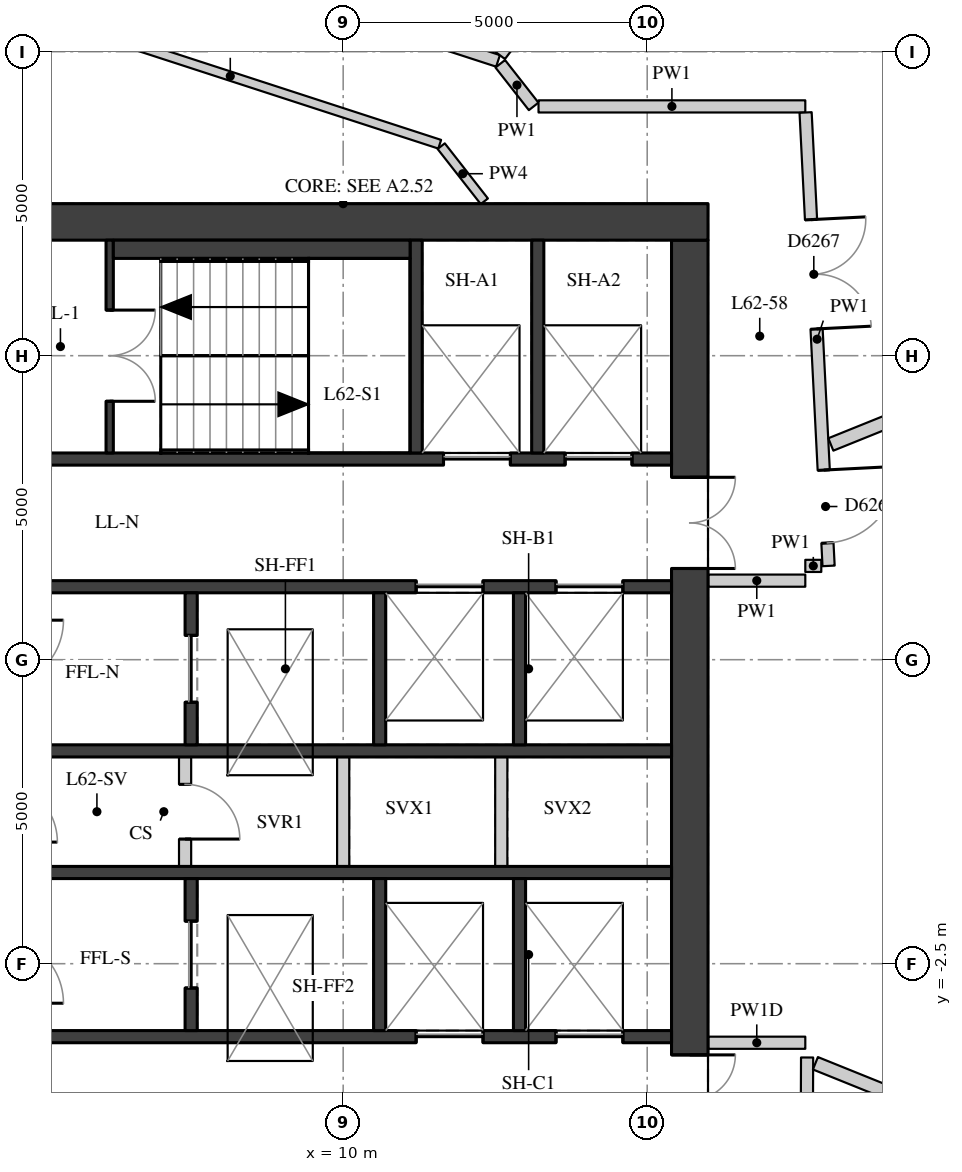
"""IFC4 building model, lengths in metres.
Left out: names, types, materials, properties, quantities, classifications, styles, units other than length and angle.
Written with IfcOpenShell. Run it as: python <this file> out.ifc"""

import sys

from ifc_helpers import new_model, si_unit, direction, frame, frame_2d, origin, place, context, subcontext, project, spatial, rectangle, extrude, element, fill, save


model = new_model("IFC4")
c1 = context("Model", 3, precision=1e-05, world=origin(), true_north=direction((0.0, 1.0)))
c2 = subcontext(c1, "Body", "Model", "MODEL_VIEW")
j1 = project(units=[si_unit("LENGTHUNIT", "METRE"), si_unit("PLANEANGLEUNIT", "RADIAN")], contexts=[c1])
p1 = place(None, origin())
s1 = spatial("IfcSite", under=j1, at=p1, CompositionType="ELEMENT")
p2 = place(p1, origin())
s2 = spatial("IfcBuilding", under=s1, at=p2, CompositionType="ELEMENT")
p3 = place(p2, frame((0.0, 0.0, 218.9)))
s3 = spatial("IfcBuildingStorey", under=s2, at=p3, CompositionType="ELEMENT", Elevation=218.9)
p4 = place(p3, frame((15.7, -9.4, 0.0), z_axis=(0.0, 0.0, 1.0), x_axis=(0.0, 1.0, 0.0)))
e1 = element("IfcWall", 1, at=p4, inside=s3, PredefinedType="SHEAR", context=c2, shape_type="SweptSolid", body=[
    extrude(rectangle(XDim=18.8, YDim=0.6, at=frame_2d((9.4, 0.0))), origin(), (0.0, 0.0, 1.0), 3.02),
])
p5 = place(p4, frame((13.4, 0.0, 0.0)))
e2 = element("IfcOpeningElement", 2, at=p5, cuts=e1, PredefinedType="OPENING", context=c2, shape_type="SweptSolid", body=[
    extrude(rectangle(XDim=1.5, YDim=2.1, at=frame_2d((0.75, 1.05))), frame((0.0, 0.31, 0.0), z_axis=(0.0, -1.0, 0.0), x_axis=(1.0, 0.0, 0.0)), (0.0, 0.0, 1.0), 0.62),
])
p6 = place(p4, frame((3.9, 0.0, 0.0)))
e3 = element("IfcOpeningElement", 3, at=p6, cuts=e1, PredefinedType="OPENING", context=c2, shape_type="SweptSolid", body=[
    extrude(rectangle(XDim=1.5, YDim=2.1, at=frame_2d((0.75, 1.05))), frame((0.0, 0.31, 0.0), z_axis=(0.0, -1.0, 0.0), x_axis=(1.0, 0.0, 0.0)), (0.0, 0.0, 1.0), 0.62),
])
p7 = place(p3, frame((4.0, 9.7, 0.0), z_axis=(0.0, 0.0, 1.0), x_axis=(1.0, 0.0, 0.0)))
e4 = element("IfcWall", 4, at=p7, inside=s3, PredefinedType="SHEAR", context=c2, shape_type="SweptSolid", body=[
    extrude(rectangle(XDim=12.0, YDim=0.6, at=frame_2d((6.0, 0.0))), origin(), (0.0, 0.0, 1.0), 3.02),
])
p8 = place(p3, frame((4.6, 5.8, 0.0), z_axis=(0.0, 0.0, 1.0), x_axis=(1.0, 0.0, 0.0)))
e5 = element("IfcWall", 5, at=p8, inside=s3, PredefinedType="SHEAR", context=c2, shape_type="SweptSolid", body=[
    extrude(rectangle(XDim=10.8, YDim=0.2, at=frame_2d((5.4, 0.0))), origin(), (0.0, 0.0, 1.0), 3.02),
])
p9 = place(p8, frame((7.05, 0.0, 0.0)))
e6 = element("IfcOpeningElement", 6, at=p9, cuts=e5, PredefinedType="OPENING", context=c2, shape_type="SweptSolid", body=[
    extrude(rectangle(XDim=1.1, YDim=2.1, at=frame_2d((0.55, 1.05))), frame((0.0, 0.11, 0.0), z_axis=(0.0, -1.0, 0.0), x_axis=(1.0, 0.0, 0.0)), (0.0, 0.0, 1.0), 0.22),
])
p10 = place(p8, frame((9.05, 0.0, 0.0)))
e7 = element("IfcOpeningElement", 7, at=p10, cuts=e5, PredefinedType="OPENING", context=c2, shape_type="SweptSolid", body=[
    extrude(rectangle(XDim=1.1, YDim=2.1, at=frame_2d((0.55, 1.05))), frame((0.0, 0.11, 0.0), z_axis=(0.0, -1.0, 0.0), x_axis=(1.0, 0.0, 0.0)), (0.0, 0.0, 1.0), 0.22),
])
p11 = place(p3, frame((4.6, 3.7, 0.0), z_axis=(0.0, 0.0, 1.0), x_axis=(1.0, 0.0, 0.0)))
e8 = element("IfcWall", 8, at=p11, inside=s3, PredefinedType="SHEAR", context=c2, shape_type="SweptSolid", body=[
    extrude(rectangle(XDim=10.8, YDim=0.2, at=frame_2d((5.4, 0.0))), origin(), (0.0, 0.0, 1.0), 3.02),
])
p12 = place(p11, frame((6.6, 0.0, 0.0)))
e9 = element("IfcOpeningElement", 9, at=p12, cuts=e8, PredefinedType="OPENING", context=c2, shape_type="SweptSolid", body=[
    extrude(rectangle(XDim=1.1, YDim=2.1, at=frame_2d((0.55, 1.05))), frame((0.0, 0.11, 0.0), z_axis=(0.0, -1.0, 0.0), x_axis=(1.0, 0.0, 0.0)), (0.0, 0.0, 1.0), 0.22),
])
p13 = place(p11, frame((8.9, 0.0, 0.0)))
e10 = element("IfcOpeningElement", 10, at=p13, cuts=e8, PredefinedType="OPENING", context=c2, shape_type="SweptSolid", body=[
    extrude(rectangle(XDim=1.1, YDim=2.1, at=frame_2d((0.55, 1.05))), frame((0.0, 0.11, 0.0), z_axis=(0.0, -1.0, 0.0), x_axis=(1.0, 0.0, 0.0)), (0.0, 0.0, 1.0), 0.22),
])
for number, where, z_axis, x_axis in (
    (11, (4.6, 1.0, 0.0), (0.0, 0.0, 1.0), (1.0, 0.0, 0.0)),
    (12, (4.6, -1.0, 0.0), (0.0, 0.0, 1.0), (1.0, 0.0, 0.0)),
):
    element("IfcWall", number, at=place(p3, frame(where, z_axis=z_axis, x_axis=x_axis)), inside=s3, PredefinedType="SHEAR", context=c2, shape_type="SweptSolid", body=[
        extrude(rectangle(XDim=10.8, YDim=0.2, at=frame_2d((5.4, 0.0))), origin(), (0.0, 0.0, 1.0), 3.02),
    ])
p14 = place(p3, frame((4.6, -3.7, 0.0), z_axis=(0.0, 0.0, 1.0), x_axis=(1.0, 0.0, 0.0)))
e13 = element("IfcWall", 13, at=p14, inside=s3, PredefinedType="SHEAR", context=c2, shape_type="SweptSolid", body=[
    extrude(rectangle(XDim=10.8, YDim=0.2, at=frame_2d((5.4, 0.0))), origin(), (0.0, 0.0, 1.0), 3.02),
])
p15 = place(p14, frame((6.6, 0.0, 0.0)))
e14 = element("IfcOpeningElement", 14, at=p15, cuts=e13, PredefinedType="OPENING", context=c2, shape_type="SweptSolid", body=[
    extrude(rectangle(XDim=1.1, YDim=2.1, at=frame_2d((0.55, 1.05))), frame((0.0, 0.11, 0.0), z_axis=(0.0, -1.0, 0.0), x_axis=(1.0, 0.0, 0.0)), (0.0, 0.0, 1.0), 0.22),
])
p16 = place(p14, frame((8.9, 0.0, 0.0)))
e15 = element("IfcOpeningElement", 15, at=p16, cuts=e13, PredefinedType="OPENING", context=c2, shape_type="SweptSolid", body=[
    extrude(rectangle(XDim=1.1, YDim=2.1, at=frame_2d((0.55, 1.05))), frame((0.0, 0.11, 0.0), z_axis=(0.0, -1.0, 0.0), x_axis=(1.0, 0.0, 0.0)), (0.0, 0.0, 1.0), 0.22),
])
for number, where, z_axis, x_axis in (
    (16, (11.2, 5.9, 0.0), (0.0, 0.0, 1.0), (0.0, 1.0, 0.0)),
    (17, (13.2, 5.9, 0.0), (0.0, 0.0, 1.0), (0.0, 1.0, 0.0)),
):
    element("IfcWall", number, at=place(p3, frame(where, z_axis=z_axis, x_axis=x_axis)), inside=s3, PredefinedType="SHEAR", context=c2, shape_type="SweptSolid", body=[
        extrude(rectangle(XDim=3.5, YDim=0.2, at=frame_2d((1.75, 0.0))), origin(), (0.0, 0.0, 1.0), 3.02),
    ])
p17 = place(p3, frame((7.5, 1.1, 0.0), z_axis=(0.0, 0.0, 1.0), x_axis=(0.0, 1.0, 0.0)))
e18 = element("IfcWall", 18, at=p17, inside=s3, PredefinedType="SHEAR", context=c2, shape_type="SweptSolid", body=[
    extrude(rectangle(XDim=2.5, YDim=0.2, at=frame_2d((1.25, 0.0))), origin(), (0.0, 0.0, 1.0), 3.02),
])
p18 = place(p17, frame((0.7, 0.0, 0.0)))
e19 = element("IfcOpeningElement", 19, at=p18, cuts=e18, PredefinedType="OPENING", context=c2, shape_type="SweptSolid", body=[
    extrude(rectangle(XDim=1.1, YDim=2.1, at=frame_2d((0.55, 1.05))), frame((0.0, 0.11, 0.0), z_axis=(0.0, -1.0, 0.0), x_axis=(1.0, 0.0, 0.0)), (0.0, 0.0, 1.0), 0.22),
])
p19 = place(p3, frame((7.5, -3.6, 0.0), z_axis=(0.0, 0.0, 1.0), x_axis=(0.0, 1.0, 0.0)))
e20 = element("IfcWall", 20, at=p19, inside=s3, PredefinedType="SHEAR", context=c2, shape_type="SweptSolid", body=[
    extrude(rectangle(XDim=2.5, YDim=0.2, at=frame_2d((1.25, 0.0))), origin(), (0.0, 0.0, 1.0), 3.02),
])
p20 = place(p19, frame((0.7, 0.0, 0.0)))
e21 = element("IfcOpeningElement", 21, at=p20, cuts=e20, PredefinedType="OPENING", context=c2, shape_type="SweptSolid", body=[
    extrude(rectangle(XDim=1.1, YDim=2.1, at=frame_2d((0.55, 1.05))), frame((0.0, 0.11, 0.0), z_axis=(0.0, -1.0, 0.0), x_axis=(1.0, 0.0, 0.0)), (0.0, 0.0, 1.0), 0.22),
])
for number, where, z_axis, x_axis in (
    (22, (10.6, 1.1, 0.0), (0.0, 0.0, 1.0), (0.0, 1.0, 0.0)),
    (23, (10.6, -3.6, 0.0), (0.0, 0.0, 1.0), (0.0, 1.0, 0.0)),
    (24, (12.9, 1.1, 0.0), (0.0, 0.0, 1.0), (0.0, 1.0, 0.0)),
    (25, (12.9, -3.6, 0.0), (0.0, 0.0, 1.0), (0.0, 1.0, 0.0)),
):
    element("IfcWall", number, at=place(p3, frame(where, z_axis=z_axis, x_axis=x_axis)), inside=s3, PredefinedType="SHEAR", context=c2, shape_type="SweptSolid", body=[
        extrude(rectangle(XDim=2.5, YDim=0.2, at=frame_2d((1.25, 0.0))), origin(), (0.0, 0.0, 1.0), 3.02),
    ])
p21 = place(p3, frame((6.16, 5.9, 0.0), z_axis=(0.0, 0.0, 1.0), x_axis=(0.0, 1.0, 0.0)))
e26 = element("IfcWall", 26, at=p21, inside=s3, PredefinedType="SHEAR", context=c2, shape_type="SweptSolid", body=[
    extrude(rectangle(XDim=3.5, YDim=0.12, at=frame_2d((1.75, 0.0))), origin(), (0.0, 0.0, 1.0), 3.02),
])
p22 = place(p21, frame((0.85, 0.0, 0.0)))
e27 = element("IfcOpeningElement", 27, at=p22, cuts=e26, PredefinedType="OPENING", context=c2, shape_type="SweptSolid", body=[
    extrude(rectangle(XDim=1.5, YDim=2.1, at=frame_2d((0.75, 1.05))), frame((0.0, 0.07, 0.0), z_axis=(0.0, -1.0, 0.0), x_axis=(1.0, 0.0, 0.0)), (0.0, 0.0, 1.0), 0.14),
])
p23 = place(p3, frame((7.4, -0.9, 0.0), z_axis=(0.0, 0.0, 1.0), x_axis=(0.0, 1.0, 0.0)))
e28 = element("IfcWall", 28, at=p23, inside=s3, PredefinedType="PARTITIONING", context=c2, shape_type="SweptSolid", body=[
    extrude(rectangle(XDim=1.8, YDim=0.2, at=frame_2d((0.9, 0.0))), origin(), (0.0, 0.0, 1.0), 3.02),
])
p24 = place(p23, frame((0.45, 0.0, 0.0)))
e29 = element("IfcOpeningElement", 29, at=p24, cuts=e28, PredefinedType="OPENING", context=c2, shape_type="SweptSolid", body=[
    extrude(rectangle(XDim=0.9, YDim=2.1, at=frame_2d((0.45, 1.05))), frame((0.0, 0.11, 0.0), z_axis=(0.0, -1.0, 0.0), x_axis=(1.0, 0.0, 0.0)), (0.0, 0.0, 1.0), 0.22),
])
for number, where, z_axis, x_axis in (
    (30, (10.0, -0.9, 0.0), (0.0, 0.0, 1.0), (0.0, 1.0, 0.0)),
    (31, (12.6, -0.9, 0.0), (0.0, 0.0, 1.0), (0.0, 1.0, 0.0)),
):
    element("IfcWall", number, at=place(p3, frame(where, z_axis=z_axis, x_axis=x_axis)), inside=s3, PredefinedType="PARTITIONING", context=c2, shape_type="SweptSolid", body=[
        extrude(rectangle(XDim=1.8, YDim=0.2, at=frame_2d((0.9, 0.0))), origin(), (0.0, 0.0, 1.0), 3.02),
    ])
p25 = place(p3, frame((6.22, 9.25, 0.0), z_axis=(0.0, 0.0, 1.0), x_axis=(1.0, 0.0, 0.0)))
e32 = element("IfcWall", 32, at=p25, inside=s3, PredefinedType="PARTITIONING", context=c2, shape_type="SweptSolid", body=[
    extrude(rectangle(XDim=4.88, YDim=0.3, at=frame_2d((2.44, 0.0))), origin(), (0.0, 0.0, 1.0), 3.02),
])
p26 = place(p3, frame((17.63, -4.043, 0.0), z_axis=(0.0, 0.0, 1.0), x_axis=(-0.003908870153, -0.999992360338, 0.0)))
e33 = element("IfcWall", 33, at=p26, inside=s3, PredefinedType="PARTITIONING", context=c2, shape_type="SweptSolid", body=[
    extrude(rectangle(XDim=7.557, YDim=0.2, at=frame_2d((3.779, 0.0))), origin(), (0.0, 0.0, 1.0), 3.02),
])
p27 = place(p3, frame((0.795, 16.169, 0.0), z_axis=(0.0, 0.0, 1.0), x_axis=(0.950998491074, -0.309195520626, 0.0)))
e34 = element("IfcWall", 34, at=p27, inside=s3, PredefinedType="PARTITIONING", context=c2, shape_type="SweptSolid", body=[
    extrude(rectangle(XDim=12.357, YDim=0.2, at=frame_2d((6.179, 0.0))), origin(), (0.0, 0.0, 1.0), 3.02),
])
p28 = place(p27, frame((8.496, 0.0, 0.0)))
e35 = element("IfcOpeningElement", 35, at=p28, cuts=e34, PredefinedType="OPENING", context=c2, shape_type="SweptSolid", body=[
    extrude(rectangle(XDim=1.1, YDim=2.1, at=frame_2d((0.55, 1.05))), frame((0.0, 0.11, 0.0), z_axis=(0.0, -1.0, 0.0), x_axis=(1.0, 0.0, 0.0)), (0.0, 0.0, 1.0), 0.22),
])
p29 = place(p27, frame((4.169, 0.0, 0.0)))
e36 = element("IfcOpeningElement", 36, at=p29, cuts=e34, PredefinedType="OPENING", context=c2, shape_type="SweptSolid", body=[
    extrude(rectangle(XDim=0.9, YDim=2.1, at=frame_2d((0.45, 1.05))), frame((0.0, 0.11, 0.0), z_axis=(0.0, -1.0, 0.0), x_axis=(1.0, 0.0, 0.0)), (0.0, 0.0, 1.0), 0.22),
])
p30 = place(p27, frame((0.747, 0.0, 0.0)))
e37 = element("IfcOpeningElement", 37, at=p30, cuts=e34, PredefinedType="OPENING", context=c2, shape_type="SweptSolid", body=[
    extrude(rectangle(XDim=0.9, YDim=2.1, at=frame_2d((0.45, 1.05))), frame((0.0, 0.11, 0.0), z_axis=(0.0, -1.0, 0.0), x_axis=(1.0, 0.0, 0.0)), (0.0, 0.0, 1.0), 0.22),
])
p31 = place(p3, frame((12.583, 12.301, 0.0), z_axis=(0.0, 0.0, 1.0), x_axis=(0.616670471626, -0.787221397972, 0.0)))
e38 = element("IfcWall", 38, at=p31, inside=s3, PredefinedType="PARTITIONING", context=c2, shape_type="SweptSolid", body=[
    extrude(rectangle(XDim=0.89, YDim=0.2, at=frame_2d((0.445, 0.0))), origin(), (0.0, 0.0, 1.0), 3.02),
])
p32 = place(p3, frame((13.213, 11.6, 0.0), z_axis=(0.0, 0.0, 1.0), x_axis=(1.0, 0.0, 0.0)))
e39 = element("IfcWall", 39, at=p32, inside=s3, PredefinedType="PARTITIONING", context=c2, shape_type="SweptSolid", body=[
    extrude(rectangle(XDim=4.387, YDim=0.2, at=frame_2d((2.194, 0.0))), origin(), (0.0, 0.0, 1.0), 3.02),
])
p33 = place(p3, frame((17.605, 11.5, 0.0), z_axis=(0.0, 0.0, 1.0), x_axis=(0.050646981223, -0.998716618112, 0.0)))
e40 = element("IfcWall", 40, at=p33, inside=s3, PredefinedType="PARTITIONING", context=c2, shape_type="SweptSolid", body=[
    extrude(rectangle(XDim=7.467, YDim=0.2, at=frame_2d((3.733, 0.0))), origin(), (0.0, 0.0, 1.0), 3.02),
])
p34 = place(p33, frame((5.889, 0.0, 0.0)))
e41 = element("IfcOpeningElement", 41, at=p34, cuts=e40, PredefinedType="OPENING", context=c2, shape_type="SweptSolid", body=[
    extrude(rectangle(XDim=1.2, YDim=2.1, at=frame_2d((0.6, 1.05))), frame((0.0, 0.11, 0.0), z_axis=(0.0, -1.0, 0.0), x_axis=(1.0, 0.0, 0.0)), (0.0, 0.0, 1.0), 0.22),
])
p35 = place(p33, frame((1.765, 0.0, 0.0)))
e42 = element("IfcOpeningElement", 42, at=p35, cuts=e40, PredefinedType="OPENING", context=c2, shape_type="SweptSolid", body=[
    extrude(rectangle(XDim=1.8, YDim=2.1, at=frame_2d((0.9, 1.05))), frame((0.0, 0.11, 0.0), z_axis=(0.0, -1.0, 0.0), x_axis=(1.0, 0.0, 0.0)), (0.0, 0.0, 1.0), 0.22),
])
p36 = place(p3, frame((17.863, 4.043, 0.0), z_axis=(0.0, 0.0, 1.0), x_axis=(-1.0, 0.0, 0.0)))
e43 = element("IfcWall", 43, at=p36, inside=s3, PredefinedType="PARTITIONING", context=c2, shape_type="SweptSolid", body=[
    extrude(rectangle(XDim=0.263, YDim=0.2, at=frame_2d((0.131, 0.0))), origin(), (0.0, 0.0, 1.0), 3.02),
])
p37 = place(p3, frame((17.6, 3.8, 0.0), z_axis=(0.0, 0.0, 1.0), x_axis=(-1.0, 0.0, 0.0)))
e44 = element("IfcWall", 44, at=p37, inside=s3, PredefinedType="PARTITIONING", context=c2, shape_type="SweptSolid", body=[
    extrude(rectangle(XDim=1.596, YDim=0.2, at=frame_2d((0.798, 0.0))), origin(), (0.0, 0.0, 1.0), 3.02),
])
p38 = place(p3, frame((16.004, -3.8, 0.0), z_axis=(0.0, 0.0, 1.0), x_axis=(1.0, 0.0, 0.0)))
e45 = element("IfcWall", 45, at=p38, inside=s3, PredefinedType="PARTITIONING", context=c2, shape_type="SweptSolid", body=[
    extrude(rectangle(XDim=1.596, YDim=0.2, at=frame_2d((0.798, 0.0))), origin(), (0.0, 0.0, 1.0), 2.47),
])
p39 = place(p3, frame((4.699, 13.218, 0.0), z_axis=(0.0, 0.0, 1.0), x_axis=(0.95099963578, -0.30919199981, 0.0)))
e46 = element("IfcWall", 46, at=p39, inside=s3, PredefinedType="PARTITIONING", context=c2, shape_type="SweptSolid", body=[
    extrude(rectangle(XDim=7.244, YDim=0.15, at=frame_2d((3.622, 0.0))), origin(), (0.0, 0.0, 1.0), 3.02),
])
p40 = place(p3, frame((11.612, 10.946, 0.0), z_axis=(0.0, 0.0, 1.0), x_axis=(0.616228210046, -0.787567643535, 0.0)))
e47 = element("IfcWall", 47, at=p40, inside=s3, PredefinedType="PARTITIONING", context=c2, shape_type="SweptSolid", body=[
    extrude(rectangle(XDim=1.151, YDim=0.15, at=frame_2d((0.576, 0.0))), origin(), (0.0, 0.0, 1.0), 3.02),
])
p41 = place(p3, frame((24.295, 8.571, 0.0), z_axis=(0.0, 0.0, 1.0), x_axis=(-0.927397869515, -0.374076451569, 0.0)))
e48 = element("IfcWall", 48, at=p41, inside=s3, PredefinedType="PARTITIONING", context=c2, shape_type="SweptSolid", body=[
    extrude(rectangle(XDim=6.767, YDim=0.22, at=frame_2d((3.383, 0.0))), origin(), (0.0, 0.0, 1.0), 3.02),
])
p42 = place(p3, frame((16.863, 18.113, 0.0), z_axis=(0.0, 0.0, 1.0), x_axis=(-0.603604387564, -0.79728397909, 0.0)))
e49 = element("IfcWall", 49, at=p42, inside=s3, PredefinedType="PARTITIONING", context=c2, shape_type="SweptSolid", body=[
    extrude(rectangle(XDim=7.108, YDim=0.22, at=frame_2d((3.554, 0.0))), origin(), (0.0, 0.0, 1.0), 3.02),
])
p43 = place(p3, frame((24.295, -6.771, 0.0), z_axis=(0.0, 0.0, 1.0), x_axis=(-0.927386950843, 0.374103519639, 0.0)))
e50 = element("IfcWall", 50, at=p43, inside=s3, PredefinedType="PARTITIONING", context=c2, shape_type="SweptSolid", body=[
    extrude(rectangle(XDim=7.04, YDim=0.22, at=frame_2d((3.52, 0.0))), origin(), (0.0, 0.0, 1.0), 3.02),
])
p44 = place(p5, origin())
e51 = element("IfcDoor", 51, at=p44, inside=s3, OperationType="DOUBLE_DOOR_SINGLE_SWING", PredefinedType="DOOR", context=c2, shape_type="SweptSolid", body=[
    extrude(rectangle(XDim=1.5, YDim=2.1, at=frame_2d((0.75, 1.05))), frame((0.0, 0.025, 0.0), z_axis=(0.0, -1.0, 0.0), x_axis=(1.0, 0.0, 0.0)), (0.0, 0.0, 1.0), 0.05),
])
fill(e2, e51)
p45 = place(p6, origin())
e52 = element("IfcDoor", 52, at=p45, inside=s3, OperationType="DOUBLE_DOOR_SINGLE_SWING", PredefinedType="DOOR", context=c2, shape_type="SweptSolid", body=[
    extrude(rectangle(XDim=1.5, YDim=2.1, at=frame_2d((0.75, 1.05))), frame((0.0, 0.025, 0.0), z_axis=(0.0, -1.0, 0.0), x_axis=(1.0, 0.0, 0.0)), (0.0, 0.0, 1.0), 0.05),
])
fill(e3, e52)
p46 = place(p22, origin())
e53 = element("IfcDoor", 53, at=p46, inside=s3, OperationType="DOUBLE_DOOR_SINGLE_SWING", PredefinedType="DOOR", context=c2, shape_type="SweptSolid", body=[
    extrude(rectangle(XDim=1.5, YDim=2.1, at=frame_2d((0.75, 1.05))), frame((0.0, 0.025, 0.0), z_axis=(0.0, -1.0, 0.0), x_axis=(1.0, 0.0, 0.0)), (0.0, 0.0, 1.0), 0.05),
])
fill(e27, e53)
p47 = place(p9, origin())
e54 = element("IfcDoor", 54, at=p47, inside=s3, OperationType="DOUBLE_DOOR_SLIDING", PredefinedType="DOOR", context=c2, shape_type="SweptSolid", body=[
    extrude(rectangle(XDim=1.1, YDim=2.1, at=frame_2d((0.55, 1.05))), frame((0.0, 0.025, 0.0), z_axis=(0.0, -1.0, 0.0), x_axis=(1.0, 0.0, 0.0)), (0.0, 0.0, 1.0), 0.05),
])
fill(e6, e54)
p48 = place(p10, origin())
e55 = element("IfcDoor", 55, at=p48, inside=s3, OperationType="DOUBLE_DOOR_SLIDING", PredefinedType="DOOR", context=c2, shape_type="SweptSolid", body=[
    extrude(rectangle(XDim=1.1, YDim=2.1, at=frame_2d((0.55, 1.05))), frame((0.0, 0.025, 0.0), z_axis=(0.0, -1.0, 0.0), x_axis=(1.0, 0.0, 0.0)), (0.0, 0.0, 1.0), 0.05),
])
fill(e7, e55)
p49 = place(p12, origin())
e56 = element("IfcDoor", 56, at=p49, inside=s3, OperationType="DOUBLE_DOOR_SLIDING", PredefinedType="DOOR", context=c2, shape_type="SweptSolid", body=[
    extrude(rectangle(XDim=1.1, YDim=2.1, at=frame_2d((0.55, 1.05))), frame((0.0, 0.025, 0.0), z_axis=(0.0, -1.0, 0.0), x_axis=(1.0, 0.0, 0.0)), (0.0, 0.0, 1.0), 0.05),
])
fill(e9, e56)
p50 = place(p13, origin())
e57 = element("IfcDoor", 57, at=p50, inside=s3, OperationType="DOUBLE_DOOR_SLIDING", PredefinedType="DOOR", context=c2, shape_type="SweptSolid", body=[
    extrude(rectangle(XDim=1.1, YDim=2.1, at=frame_2d((0.55, 1.05))), frame((0.0, 0.025, 0.0), z_axis=(0.0, -1.0, 0.0), x_axis=(1.0, 0.0, 0.0)), (0.0, 0.0, 1.0), 0.05),
])
fill(e10, e57)
p51 = place(p15, origin())
e58 = element("IfcDoor", 58, at=p51, inside=s3, OperationType="DOUBLE_DOOR_SLIDING", PredefinedType="DOOR", context=c2, shape_type="SweptSolid", body=[
    extrude(rectangle(XDim=1.1, YDim=2.1, at=frame_2d((0.55, 1.05))), frame((0.0, 0.025, 0.0), z_axis=(0.0, -1.0, 0.0), x_axis=(1.0, 0.0, 0.0)), (0.0, 0.0, 1.0), 0.05),
])
fill(e14, e58)
p52 = place(p16, origin())
e59 = element("IfcDoor", 59, at=p52, inside=s3, OperationType="DOUBLE_DOOR_SLIDING", PredefinedType="DOOR", context=c2, shape_type="SweptSolid", body=[
    extrude(rectangle(XDim=1.1, YDim=2.1, at=frame_2d((0.55, 1.05))), frame((0.0, 0.025, 0.0), z_axis=(0.0, -1.0, 0.0), x_axis=(1.0, 0.0, 0.0)), (0.0, 0.0, 1.0), 0.05),
])
fill(e15, e59)
p53 = place(p18, origin())
e60 = element("IfcDoor", 60, at=p53, inside=s3, OperationType="DOUBLE_DOOR_SLIDING", PredefinedType="DOOR", context=c2, shape_type="SweptSolid", body=[
    extrude(rectangle(XDim=1.1, YDim=2.1, at=frame_2d((0.55, 1.05))), frame((0.0, 0.025, 0.0), z_axis=(0.0, -1.0, 0.0), x_axis=(1.0, 0.0, 0.0)), (0.0, 0.0, 1.0), 0.05),
])
fill(e19, e60)
p54 = place(p20, origin())
e61 = element("IfcDoor", 61, at=p54, inside=s3, OperationType="DOUBLE_DOOR_SLIDING", PredefinedType="DOOR", context=c2, shape_type="SweptSolid", body=[
    extrude(rectangle(XDim=1.1, YDim=2.1, at=frame_2d((0.55, 1.05))), frame((0.0, 0.025, 0.0), z_axis=(0.0, -1.0, 0.0), x_axis=(1.0, 0.0, 0.0)), (0.0, 0.0, 1.0), 0.05),
])
fill(e21, e61)
p55 = place(p24, origin())
e62 = element("IfcDoor", 62, at=p55, inside=s3, OperationType="SINGLE_SWING_RIGHT", PredefinedType="DOOR", context=c2, shape_type="SweptSolid", body=[
    extrude(rectangle(XDim=0.9, YDim=2.1, at=frame_2d((0.45, 1.05))), frame((0.0, 0.025, 0.0), z_axis=(0.0, -1.0, 0.0), x_axis=(1.0, 0.0, 0.0)), (0.0, 0.0, 1.0), 0.05),
])
fill(e29, e62)
p56 = place(p34, origin())
e63 = element("IfcDoor", 63, at=p56, inside=s3, OperationType="SINGLE_SWING_LEFT", PredefinedType="DOOR", context=c2, shape_type="SweptSolid", body=[
    extrude(rectangle(XDim=1.2, YDim=2.1, at=frame_2d((0.6, 1.05))), frame((0.0, 0.025, 0.0), z_axis=(0.0, -1.0, 0.0), x_axis=(1.0, 0.0, 0.0)), (0.0, 0.0, 1.0), 0.05),
])
fill(e41, e63)
p57 = place(p35, origin())
e64 = element("IfcDoor", 64, at=p57, inside=s3, OperationType="DOUBLE_DOOR_SINGLE_SWING", PredefinedType="DOOR", context=c2, shape_type="SweptSolid", body=[
    extrude(rectangle(XDim=1.8, YDim=2.1, at=frame_2d((0.9, 1.05))), frame((0.0, 0.025, 0.0), z_axis=(0.0, -1.0, 0.0), x_axis=(1.0, 0.0, 0.0)), (0.0, 0.0, 1.0), 0.05),
])
fill(e42, e64)
save(model, sys.argv[1])
